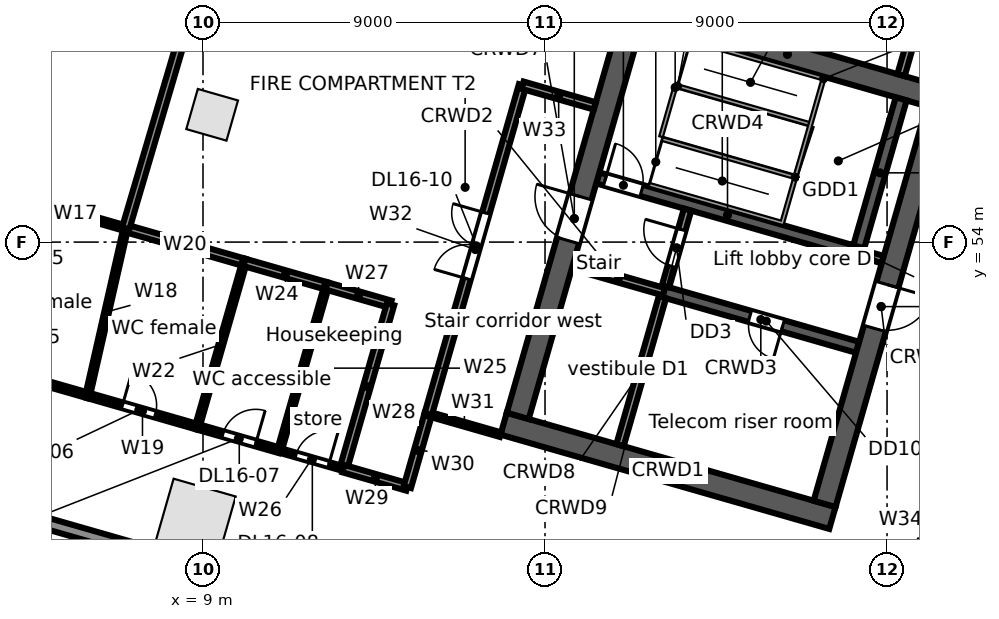
"""IFC4 building model, lengths in metres.
Left out: names, types, materials, properties, quantities, classifications, styles, units other than length and angle.
Written with IfcOpenShell. Run it as: python <this file> out.ifc"""

import sys

from ifc_helpers import new_model, si_unit, direction, frame, frame_2d, origin, origin_2d, place, context, subcontext, project, spatial, rectangle, extrude, element, fill, save


model = new_model("IFC4")
c1 = context("Model", 3, precision=1e-05, world=origin(), true_north=direction((0.0, 1.0)))
c2 = subcontext(c1, "Body", "Model", "MODEL_VIEW")
j1 = project(units=[si_unit("LENGTHUNIT", "METRE"), si_unit("PLANEANGLEUNIT", "RADIAN")], contexts=[c1])
p1 = place(None, origin())
s1 = spatial("IfcSite", under=j1, at=p1, CompositionType="ELEMENT")
p2 = place(p1, origin())
s2 = spatial("IfcBuilding", under=s1, at=p2, CompositionType="ELEMENT")
p3 = place(p2, frame((0.0, 0.0, 81.5)))
s3 = spatial("IfcBuildingStorey", under=s2, at=p3, CompositionType="ELEMENT", Elevation=81.5)
p4 = place(p3, frame((8.81, 46.722, 0.0), z_axis=(0.0, 0.0, 1.0), x_axis=(0.961261695938, -0.275637355817, 0.0)))
e1 = element("IfcColumn", 1, at=p4, inside=s3, PredefinedType="COLUMN", context=c2, shape_type="SweptSolid", body=[
    extrude(rectangle(XDim=1.7, YDim=1.7, at=origin_2d()), origin(), (0.0, 0.0, 1.0), 5.0),
])
p5 = place(p3, frame((9.241, 57.35, 0.0), z_axis=(0.0, 0.0, 1.0), x_axis=(0.961261695938, -0.275637355817, 0.0)))
e2 = element("IfcColumn", 2, at=p5, inside=s3, PredefinedType="COLUMN", context=c2, shape_type="SweptSolid", body=[
    extrude(rectangle(XDim=1.1, YDim=1.1, at=origin_2d()), origin(), (0.0, 0.0, 1.0), 5.0),
])
p6 = place(p3, frame((25.398, 40.717, 0.0), z_axis=(0.0, 0.0, 1.0), x_axis=(-0.961262423262, 0.275634819324, 0.0)))
e3 = element("IfcWall", 3, at=p6, inside=s3, PredefinedType="STANDARD", context=c2, shape_type="SweptSolid", body=[
    extrude(rectangle(XDim=26.359, YDim=0.3, at=frame_2d((13.179, 0.0))), origin(), (0.0, 0.0, 1.0), 4.68),
])
p7 = place(p6, frame((22.664, 0.0, 0.6)))
e4 = element("IfcOpeningElement", 4, at=p7, cuts=e3, PredefinedType="OPENING", context=c2, shape_type="SweptSolid", body=[
    extrude(rectangle(XDim=0.9, YDim=3.2, at=frame_2d((0.45, 1.6))), frame((0.0, 0.16, 0.0), z_axis=(0.0, -1.0, 0.0), x_axis=(1.0, 0.0, 0.0)), (0.0, 0.0, 1.0), 0.32),
])
p8 = place(p6, frame((13.844, 0.0, 0.6)))
e5 = element("IfcOpeningElement", 5, at=p8, cuts=e3, PredefinedType="OPENING", context=c2, shape_type="SweptSolid", body=[
    extrude(rectangle(XDim=0.9, YDim=3.2, at=frame_2d((0.45, 1.6))), frame((0.0, 0.16, 0.0), z_axis=(0.0, -1.0, 0.0), x_axis=(1.0, 0.0, 0.0)), (0.0, 0.0, 1.0), 0.32),
])
p9 = place(p6, frame((5.023, 0.0, 0.6)))
e6 = element("IfcOpeningElement", 6, at=p9, cuts=e3, PredefinedType="OPENING", context=c2, shape_type="SweptSolid", body=[
    extrude(rectangle(XDim=0.9, YDim=3.2, at=frame_2d((0.45, 1.6))), frame((0.0, 0.16, 0.0), z_axis=(0.0, -1.0, 0.0), x_axis=(1.0, 0.0, 0.0)), (0.0, 0.0, 1.0), 0.32),
])
p10 = place(p3, frame((16.911, 49.221, 0.0), z_axis=(0.0, 0.0, 1.0), x_axis=(0.96126248289, -0.275634611374, 0.0)))
e7 = element("IfcWall", 7, at=p10, inside=s3, PredefinedType="SOLIDWALL", context=c2, shape_type="SweptSolid", body=[
    extrude(rectangle(XDim=9.0, YDim=0.6, at=frame_2d((4.5, 0.0))), origin(), (0.0, 0.0, 1.0), 4.68),
])
p11 = place(p3, frame((18.728, 53.382, 0.0), z_axis=(0.0, 0.0, 1.0), x_axis=(0.961247070632, -0.275688355216, 0.0)))
e8 = element("IfcWall", 8, at=p11, inside=s3, PredefinedType="SOLIDWALL", context=c2, shape_type="SweptSolid", body=[
    extrude(rectangle(XDim=2.5, YDim=0.2, at=frame_2d((1.25, 0.0))), origin(), (0.0, 0.0, 1.0), 4.68),
])
p12 = place(p3, frame((21.131, 52.692, 0.0), z_axis=(0.0, 0.0, 1.0), x_axis=(0.961271492568, -0.275603188616, 0.0)))
e9 = element("IfcWall", 9, at=p12, inside=s3, PredefinedType="SOLIDWALL", context=c2, shape_type="SweptSolid", body=[
    extrude(rectangle(XDim=5.3, YDim=0.3, at=frame_2d((2.65, 0.0))), origin(), (0.0, 0.0, 1.0), 4.68),
])
p13 = place(p12, frame((2.35, 0.0, 0.0)))
e10 = element("IfcOpeningElement", 10, at=p13, cuts=e9, PredefinedType="OPENING", context=c2, shape_type="SweptSolid", body=[
    extrude(rectangle(XDim=0.9, YDim=2.1, at=frame_2d((0.45, 1.05))), frame((0.0, 0.16, 0.0), z_axis=(0.0, -1.0, 0.0), x_axis=(1.0, 0.0, 0.0)), (0.0, 0.0, 1.0), 0.32),
])
p14 = place(p3, frame((19.389, 55.689, 0.0), z_axis=(0.0, 0.0, 1.0), x_axis=(0.961261397636, -0.275638396117, 0.0)))
e11 = element("IfcWall", 11, at=p14, inside=s3, PredefinedType="SOLIDWALL", context=c2, shape_type="SweptSolid", body=[
    extrude(rectangle(XDim=7.1, YDim=0.3, at=frame_2d((3.55, 0.0))), origin(), (0.0, 0.0, 1.0), 4.68),
])
p15 = place(p14, frame((0.2, 0.0, 0.0)))
e12 = element("IfcOpeningElement", 12, at=p15, cuts=e11, PredefinedType="OPENING", context=c2, shape_type="SweptSolid", body=[
    extrude(rectangle(XDim=1.0, YDim=2.1, at=frame_2d((0.5, 1.05))), frame((0.0, 0.16, 0.0), z_axis=(0.0, -1.0, 0.0), x_axis=(1.0, 0.0, 0.0)), (0.0, 0.0, 1.0), 0.32),
])
p16 = place(p3, frame((26.214, 53.732, 0.0), z_axis=(0.0, 0.0, 1.0), x_axis=(0.96122076476, -0.27578005982, 0.0)))
e13 = element("IfcWall", 13, at=p16, inside=s3, PredefinedType="SOLIDWALL", context=c2, shape_type="SweptSolid", body=[
    extrude(rectangle(XDim=0.7, YDim=0.2, at=frame_2d((0.35, 0.0))), origin(), (0.0, 0.0, 1.0), 4.68),
])
p17 = place(p3, frame((20.053, 60.18, 0.0), z_axis=(0.0, 0.0, 1.0), x_axis=(0.96126248289, -0.275634611374, 0.0)))
e14 = element("IfcWall", 14, at=p17, inside=s3, PredefinedType="SOLIDWALL", context=c2, shape_type="SweptSolid", body=[
    extrude(rectangle(XDim=9.0, YDim=0.6, at=frame_2d((4.5, 0.0))), origin(), (0.0, 0.0, 1.0), 4.68),
])
p18 = place(p3, frame((17.282, 49.427, 0.0), z_axis=(0.0, 0.0, 1.0), x_axis=(0.275631631629, 0.961263337304, 0.0)))
e15 = element("IfcWall", 15, at=p18, inside=s3, PredefinedType="SOLIDWALL", context=c2, shape_type="SweptSolid", body=[
    extrude(rectangle(XDim=10.8, YDim=0.6, at=frame_2d((5.4, 0.0))), origin(), (0.0, 0.0, 1.0), 4.68),
])
p19 = place(p18, frame((4.8, 0.0, 0.0)))
e16 = element("IfcOpeningElement", 16, at=p19, cuts=e15, PredefinedType="OPENING", context=c2, shape_type="SweptSolid", body=[
    extrude(rectangle(XDim=1.2, YDim=2.1, at=frame_2d((0.6, 1.05))), frame((0.0, 0.31, 0.0), z_axis=(0.0, -1.0, 0.0), x_axis=(1.0, 0.0, 0.0)), (0.0, 0.0, 1.0), 0.62),
])
p20 = place(p3, frame((19.973, 48.655, 0.0), z_axis=(0.0, 0.0, 1.0), x_axis=(0.275668441653, 0.961252781674, 0.0)))
e17 = element("IfcWall", 17, at=p20, inside=s3, PredefinedType="SOLIDWALL", context=c2, shape_type="SweptSolid", body=[
    extrude(rectangle(XDim=4.05, YDim=0.2, at=frame_2d((2.025, 0.0))), origin(), (0.0, 0.0, 1.0), 4.68),
])
p21 = place(p3, frame((21.172, 52.837, 0.0), z_axis=(0.0, 0.0, 1.0), x_axis=(0.275657676022, 0.961255868981, 0.0)))
e18 = element("IfcWall", 18, at=p21, inside=s3, PredefinedType="PARTITIONING", context=c2, shape_type="SweptSolid", body=[
    extrude(rectangle(XDim=2.1, YDim=0.2, at=frame_2d((1.05, 0.0))), origin(), (0.0, 0.0, 1.0), 4.68),
])
p22 = place(p21, frame((0.55, 0.0, 0.0)))
e19 = element("IfcOpeningElement", 19, at=p22, cuts=e18, PredefinedType="OPENING", context=c2, shape_type="SweptSolid", body=[
    extrude(rectangle(XDim=1.0, YDim=2.1, at=frame_2d((0.5, 1.05))), frame((0.0, 0.11, 0.0), z_axis=(0.0, -1.0, 0.0), x_axis=(1.0, 0.0, 0.0)), (0.0, 0.0, 1.0), 0.22),
])
p23 = place(p3, frame((26.256, 53.876, 0.0), z_axis=(0.0, 0.0, 1.0), x_axis=(0.275612739511, 0.961268754209, 0.0)))
e20 = element("IfcWall", 20, at=p23, inside=s3, PredefinedType="SOLIDWALL", context=c2, shape_type="SweptSolid", body=[
    extrude(rectangle(XDim=4.05, YDim=0.3, at=frame_2d((2.025, 0.0))), origin(), (0.0, 0.0, 1.0), 4.68),
])
p24 = place(p3, frame((25.356, 47.112, 0.0), z_axis=(0.0, 0.0, 1.0), x_axis=(0.275631631629, 0.961263337304, 0.0)))
e21 = element("IfcWall", 21, at=p24, inside=s3, PredefinedType="SOLIDWALL", context=c2, shape_type="SweptSolid", body=[
    extrude(rectangle(XDim=10.8, YDim=0.6, at=frame_2d((5.4, 0.0))), origin(), (0.0, 0.0, 1.0), 4.68),
])
p25 = place(p24, frame((4.8, 0.0, 0.0)))
e22 = element("IfcOpeningElement", 22, at=p25, cuts=e21, PredefinedType="OPENING", context=c2, shape_type="SweptSolid", body=[
    extrude(rectangle(XDim=1.2, YDim=2.1, at=frame_2d((0.6, 1.05))), frame((0.0, 0.31, 0.0), z_axis=(0.0, -1.0, 0.0), x_axis=(1.0, 0.0, 0.0)), (0.0, 0.0, 1.0), 0.62),
])
p26 = place(p3, frame((2.601, 50.932, 0.0), z_axis=(0.0, 0.0, 1.0), x_axis=(0.961265606965, -0.27562371608, 0.0)))
e23 = element("IfcWall", 23, at=p26, inside=s3, PredefinedType="PARTITIONING", context=c2, shape_type="SweptSolid", body=[
    extrude(rectangle(XDim=3.5, YDim=0.15, at=frame_2d((1.75, 0.0))), origin(), (0.0, 0.0, 1.0), 4.68),
])
p27 = place(p26, frame((1.2, 0.0, 0.0)))
e24 = element("IfcOpeningElement", 24, at=p27, cuts=e23, PredefinedType="OPENING", context=c2, shape_type="SweptSolid", body=[
    extrude(rectangle(XDim=0.9, YDim=2.1, at=frame_2d((0.45, 1.05))), frame((0.0, 0.085, 0.0), z_axis=(0.0, -1.0, 0.0), x_axis=(1.0, 0.0, 0.0)), (0.0, 0.0, 1.0), 0.17),
])
p28 = place(p3, frame((4.322, 55.12, 0.0), z_axis=(0.0, 0.0, 1.0), x_axis=(0.961272337704, -0.275600240865, 0.0)))
e25 = element("IfcWall", 25, at=p28, inside=s3, PredefinedType="PARTITIONING", context=c2, shape_type="SweptSolid", body=[
    extrude(rectangle(XDim=2.75, YDim=0.15, at=frame_2d((1.375, 0.0))), origin(), (0.0, 0.0, 1.0), 4.68),
])
p29 = place(p3, frame((5.966, 49.967, 0.0), z_axis=(0.0, 0.0, 1.0), x_axis=(0.221859891223, 0.975078555126, 0.0)))
e26 = element("IfcWall", 26, at=p29, inside=s3, PredefinedType="PARTITIONING", context=c2, shape_type="SweptSolid", body=[
    extrude(rectangle(XDim=4.507, YDim=0.125, at=frame_2d((2.254, 0.0))), origin(), (0.0, 0.0, 1.0), 4.68),
])
p30 = place(p3, frame((5.966, 49.967, 0.0), z_axis=(0.0, 0.0, 1.0), x_axis=(0.961222353496, -0.275774522283, 0.0)))
e27 = element("IfcWall", 27, at=p30, inside=s3, PredefinedType="PARTITIONING", context=c2, shape_type="SweptSolid", body=[
    extrude(rectangle(XDim=2.999, YDim=0.15, at=frame_2d((1.5, 0.0))), origin(), (0.0, 0.0, 1.0), 3.852),
])
p31 = place(p30, frame((0.95, 0.0, 0.0)))
e28 = element("IfcOpeningElement", 28, at=p31, cuts=e27, PredefinedType="OPENING", context=c2, shape_type="SweptSolid", body=[
    extrude(rectangle(XDim=0.9, YDim=2.1, at=frame_2d((0.45, 1.05))), frame((0.0, 0.085, 0.0), z_axis=(0.0, -1.0, 0.0), x_axis=(1.0, 0.0, 0.0)), (0.0, 0.0, 1.0), 0.17),
])
p32 = place(p3, frame((6.966, 54.362, 0.0), z_axis=(0.0, 0.0, 1.0), x_axis=(0.961245650832, -0.275693305607, 0.0)))
e29 = element("IfcWall", 29, at=p32, inside=s3, PredefinedType="PARTITIONING", context=c2, shape_type="SweptSolid", body=[
    extrude(rectangle(XDim=3.25, YDim=0.2, at=frame_2d((1.625, 0.0))), origin(), (0.0, 0.0, 1.0), 3.852),
])
p33 = place(p3, frame((6.966, 54.362, 0.0), z_axis=(0.0, 0.0, 1.0), x_axis=(0.283027392509, 0.959111826165, 0.0)))
e30 = element("IfcWall", 30, at=p33, inside=s3, PredefinedType="PARTITIONING", context=c2, shape_type="SweptSolid", body=[
    extrude(rectangle(XDim=12.985, YDim=0.2, at=frame_2d((6.492, 0.0))), origin(), (0.0, 0.0, 1.0), 3.742),
])
p34 = place(p3, frame((8.849, 49.14, 0.0), z_axis=(0.0, 0.0, 1.0), x_axis=(0.275731175537, 0.961234788612, 0.0)))
e31 = element("IfcWall", 31, at=p34, inside=s3, PredefinedType="PARTITIONING", context=c2, shape_type="SweptSolid", body=[
    extrude(rectangle(XDim=4.501, YDim=0.125, at=frame_2d((2.25, 0.0))), origin(), (0.0, 0.0, 1.0), 3.852),
])
p35 = place(p3, frame((8.849, 49.14, 0.0), z_axis=(0.0, 0.0, 1.0), x_axis=(0.961298413165, -0.275509275429, 0.0)))
e32 = element("IfcWall", 32, at=p35, inside=s3, PredefinedType="PARTITIONING", context=c2, shape_type="SweptSolid", body=[
    extrude(rectangle(XDim=2.25, YDim=0.15, at=frame_2d((1.125, 0.0))), origin(), (0.0, 0.0, 1.0), 3.742),
])
p36 = place(p35, frame((0.7, 0.0, 0.0)))
e33 = element("IfcOpeningElement", 33, at=p36, cuts=e32, PredefinedType="OPENING", context=c2, shape_type="SweptSolid", body=[
    extrude(rectangle(XDim=0.9, YDim=2.1, at=frame_2d((0.45, 1.05))), frame((0.0, 0.085, 0.0), z_axis=(0.0, -1.0, 0.0), x_axis=(1.0, 0.0, 0.0)), (0.0, 0.0, 1.0), 0.17),
])
p37 = place(p3, frame((10.09, 53.466, 0.0), z_axis=(0.0, 0.0, 1.0), x_axis=(0.961269670038, -0.275609545309, 0.0)))
e34 = element("IfcWall", 34, at=p37, inside=s3, PredefinedType="PARTITIONING", context=c2, shape_type="SweptSolid", body=[
    extrude(rectangle(XDim=2.25, YDim=0.2, at=frame_2d((1.125, 0.0))), origin(), (0.0, 0.0, 1.0), 3.742),
])
p38 = place(p3, frame((11.012, 48.52, 0.0), z_axis=(0.0, 0.0, 1.0), x_axis=(0.275745553681, 0.96123066411, 0.0)))
e35 = element("IfcWall", 35, at=p38, inside=s3, PredefinedType="PARTITIONING", context=c2, shape_type="SweptSolid", body=[
    extrude(rectangle(XDim=4.5, YDim=0.125, at=frame_2d((2.25, 0.0))), origin(), (0.0, 0.0, 1.0), 4.68),
])
p39 = place(p3, frame((11.012, 48.52, 0.0), z_axis=(0.0, 0.0, 1.0), x_axis=(0.961323619822, -0.275421309946, 0.0)))
e36 = element("IfcWall", 36, at=p39, inside=s3, PredefinedType="PARTITIONING", context=c2, shape_type="SweptSolid", body=[
    extrude(rectangle(XDim=1.75, YDim=0.125, at=frame_2d((0.875, 0.0))), origin(), (0.0, 0.0, 1.0), 4.68),
])
p40 = place(p39, frame((0.45, 0.0, 0.0)))
e37 = element("IfcOpeningElement", 37, at=p40, cuts=e36, PredefinedType="OPENING", context=c2, shape_type="SweptSolid", body=[
    extrude(rectangle(XDim=0.9, YDim=2.1, at=frame_2d((0.45, 1.05))), frame((0.0, 0.073, 0.0), z_axis=(0.0, -1.0, 0.0), x_axis=(1.0, 0.0, 0.0)), (0.0, 0.0, 1.0), 0.145),
])
p41 = place(p3, frame((12.253, 52.846, 0.0), z_axis=(0.0, 0.0, 1.0), x_axis=(0.961175737212, -0.275936953296, 0.0)))
e38 = element("IfcWall", 38, at=p41, inside=s3, PredefinedType="PARTITIONING", context=c2, shape_type="SweptSolid", body=[
    extrude(rectangle(XDim=1.75, YDim=0.2, at=frame_2d((0.875, 0.0))), origin(), (0.0, 0.0, 1.0), 4.68),
])
p42 = place(p3, frame((12.694, 48.038, 0.0), z_axis=(0.0, 0.0, 1.0), x_axis=(0.275803080638, 0.96121415965, 0.0)))
e39 = element("IfcWall", 39, at=p42, inside=s3, PredefinedType="PARTITIONING", context=c2, shape_type="SweptSolid", body=[
    extrude(rectangle(XDim=4.5, YDim=0.2, at=frame_2d((2.25, 0.0))), origin(), (0.0, 0.0, 1.0), 4.68),
])
p43 = place(p3, frame((12.694, 48.038, 0.0), z_axis=(0.0, 0.0, 1.0), x_axis=(0.961170605556, -0.275954827854, 0.0)))
e40 = element("IfcWall", 40, at=p43, inside=s3, PredefinedType="PARTITIONING", context=c2, shape_type="SweptSolid", body=[
    extrude(rectangle(XDim=1.751, YDim=0.2, at=frame_2d((0.875, 0.0))), origin(), (0.0, 0.0, 1.0), 4.68),
])
p44 = place(p3, frame((14.377, 47.555, 0.0), z_axis=(0.0, 0.0, 1.0), x_axis=(0.275446387355, 0.961316434736, 0.0)))
e41 = element("IfcWall", 41, at=p44, inside=s3, PredefinedType="PARTITIONING", context=c2, shape_type="SweptSolid", body=[
    extrude(rectangle(XDim=2.0, YDim=0.2, at=frame_2d((1.0, 0.0))), origin(), (0.0, 0.0, 1.0), 4.68),
])
p45 = place(p3, frame((14.928, 49.478, 0.0), z_axis=(0.0, 0.0, 1.0), x_axis=(0.961243778232, -0.27569983462, 0.0)))
e42 = element("IfcWall", 42, at=p45, inside=s3, PredefinedType="PARTITIONING", context=c2, shape_type="SweptSolid", body=[
    extrude(rectangle(XDim=1.977, YDim=0.125, at=frame_2d((0.988, 0.0))), origin(), (0.0, 0.0, 1.0), 4.68),
])
p46 = place(p3, frame((14.928, 49.478, 0.0), z_axis=(0.0, 0.0, 1.0), x_axis=(0.275674053528, 0.961251172281, 0.0)))
e43 = element("IfcWall", 43, at=p46, inside=s3, PredefinedType="PARTITIONING", context=c2, shape_type="SweptSolid", body=[
    extrude(rectangle(XDim=9.0, YDim=0.2, at=frame_2d((4.5, 0.0))), origin(), (0.0, 0.0, 1.0), 3.742),
])
p47 = place(p46, frame((3.7, 0.0, 0.0)))
e44 = element("IfcOpeningElement", 44, at=p47, cuts=e43, PredefinedType="OPENING", context=c2, shape_type="SweptSolid", body=[
    extrude(rectangle(XDim=1.8, YDim=2.1, at=frame_2d((0.9, 1.05))), frame((0.0, 0.11, 0.0), z_axis=(0.0, -1.0, 0.0), x_axis=(1.0, 0.0, 0.0)), (0.0, 0.0, 1.0), 0.22),
])
p48 = place(p3, frame((17.409, 58.129, 0.0), z_axis=(0.0, 0.0, 1.0), x_axis=(0.961253165474, -0.275667103345, 0.0)))
e45 = element("IfcWall", 45, at=p48, inside=s3, PredefinedType="PARTITIONING", context=c2, shape_type="SweptSolid", body=[
    extrude(rectangle(XDim=1.977, YDim=0.2, at=frame_2d((0.988, 0.0))), origin(), (0.0, 0.0, 1.0), 4.68),
])
p49 = place(p3, frame((26.456, 42.338, 0.0), z_axis=(0.0, 0.0, 1.0), x_axis=(0.52980027265, 0.848122438743, 0.0)))
e46 = element("IfcWall", 46, at=p49, inside=s3, PredefinedType="PARTITIONING", context=c2, shape_type="SweptSolid", body=[
    extrude(rectangle(XDim=6.076, YDim=0.25, at=frame_2d((3.038, 0.0))), origin(), (0.0, 0.0, 1.0), 4.68),
])
p50 = place(p49, frame((2.2, 0.0, 0.0)))
e47 = element("IfcOpeningElement", 47, at=p50, cuts=e46, PredefinedType="OPENING", context=c2, shape_type="SweptSolid", body=[
    extrude(rectangle(XDim=1.8, YDim=2.1, at=frame_2d((0.9, 1.05))), frame((0.0, 0.135, 0.0), z_axis=(0.0, -1.0, 0.0), x_axis=(1.0, 0.0, 0.0)), (0.0, 0.0, 1.0), 0.27),
])
p51 = place(p3, frame((27.368, 58.394, 0.0), z_axis=(0.0, 0.0, 1.0), x_axis=(0.276295387056, 0.961072764722, 0.0)))
e48 = element("IfcWall", 48, at=p51, inside=s3, PredefinedType="PARTITIONING", context=c2, shape_type="SweptSolid", body=[
    extrude(rectangle(XDim=5.386, YDim=0.2, at=frame_2d((2.693, 0.0))), origin(), (0.0, 0.0, 1.0), 3.748),
])
p52 = place(p15, origin())
e49 = element("IfcDoor", 49, at=p52, inside=s3, OperationType="SINGLE_SWING_LEFT", PredefinedType="DOOR", context=c2, shape_type="SweptSolid", body=[
    extrude(rectangle(XDim=1.0, YDim=2.1, at=frame_2d((0.5, 1.05))), frame((0.0, 0.025, 0.0), z_axis=(0.0, -1.0, 0.0), x_axis=(1.0, 0.0, 0.0)), (0.0, 0.0, 1.0), 0.05),
])
fill(e12, e49)
p53 = place(p22, origin())
e50 = element("IfcDoor", 50, at=p53, inside=s3, OperationType="SINGLE_SWING_RIGHT", PredefinedType="DOOR", context=c2, shape_type="SweptSolid", body=[
    extrude(rectangle(XDim=1.0, YDim=2.1, at=frame_2d((0.5, 1.05))), frame((0.0, 0.025, 0.0), z_axis=(0.0, -1.0, 0.0), x_axis=(1.0, 0.0, 0.0)), (0.0, 0.0, 1.0), 0.05),
])
fill(e19, e50)
p54 = place(p19, origin())
e51 = element("IfcDoor", 51, at=p54, inside=s3, OperationType="SINGLE_SWING_RIGHT", PredefinedType="DOOR", context=c2, shape_type="SweptSolid", body=[
    extrude(rectangle(XDim=1.2, YDim=2.1, at=frame_2d((0.6, 1.05))), frame((0.0, 0.025, 0.0), z_axis=(0.0, -1.0, 0.0), x_axis=(1.0, 0.0, 0.0)), (0.0, 0.0, 1.0), 0.05),
])
fill(e16, e51)
p55 = place(p25, frame((1.2, 0.0, 0.0), z_axis=(0.0, 0.0, 1.0), x_axis=(-1.0, 0.0, 0.0)))
e52 = element("IfcDoor", 52, at=p55, inside=s3, OperationType="SINGLE_SWING_LEFT", PredefinedType="DOOR", context=c2, shape_type="SweptSolid", body=[
    extrude(rectangle(XDim=1.2, YDim=2.1, at=frame_2d((0.6, 1.05))), frame((0.0, 0.025, 0.0), z_axis=(0.0, -1.0, 0.0), x_axis=(1.0, 0.0, 0.0)), (0.0, 0.0, 1.0), 0.05),
])
fill(e22, e52)
p56 = place(p13, frame((0.9, 0.0, 0.0), z_axis=(0.0, 0.0, 1.0), x_axis=(-1.0, 0.0, 0.0)))
e53 = element("IfcDoor", 53, at=p56, inside=s3, OperationType="SINGLE_SWING_LEFT", PredefinedType="DOOR", context=c2, shape_type="SweptSolid", body=[
    extrude(rectangle(XDim=0.9, YDim=2.1, at=frame_2d((0.45, 1.05))), frame((0.0, 0.025, 0.0), z_axis=(0.0, -1.0, 0.0), x_axis=(1.0, 0.0, 0.0)), (0.0, 0.0, 1.0), 0.05),
])
fill(e10, e53)
p57 = place(p31, origin())
e54 = element("IfcDoor", 54, at=p57, inside=s3, OperationType="SINGLE_SWING_LEFT", PredefinedType="DOOR", context=c2, shape_type="SweptSolid", body=[
    extrude(rectangle(XDim=0.9, YDim=2.1, at=frame_2d((0.45, 1.05))), frame((0.0, 0.025, 0.0), z_axis=(0.0, -1.0, 0.0), x_axis=(1.0, 0.0, 0.0)), (0.0, 0.0, 1.0), 0.05),
])
fill(e28, e54)
p58 = place(p36, origin())
e55 = element("IfcDoor", 55, at=p58, inside=s3, OperationType="SINGLE_SWING_RIGHT", PredefinedType="DOOR", context=c2, shape_type="SweptSolid", body=[
    extrude(rectangle(XDim=0.9, YDim=2.1, at=frame_2d((0.45, 1.05))), frame((0.0, 0.025, 0.0), z_axis=(0.0, -1.0, 0.0), x_axis=(1.0, 0.0, 0.0)), (0.0, 0.0, 1.0), 0.05),
])
fill(e33, e55)
p59 = place(p40, origin())
e56 = element("IfcDoor", 56, at=p59, inside=s3, OperationType="SINGLE_SWING_RIGHT", PredefinedType="DOOR", context=c2, shape_type="SweptSolid", body=[
    extrude(rectangle(XDim=0.9, YDim=2.1, at=frame_2d((0.45, 1.05))), frame((0.0, 0.025, 0.0), z_axis=(0.0, -1.0, 0.0), x_axis=(1.0, 0.0, 0.0)), (0.0, 0.0, 1.0), 0.05),
])
fill(e37, e56)
p60 = place(p47, origin())
e57 = element("IfcDoor", 57, at=p60, inside=s3, OperationType="DOUBLE_DOOR_SINGLE_SWING", PredefinedType="DOOR", context=c2, shape_type="SweptSolid", body=[
    extrude(rectangle(XDim=1.8, YDim=2.1, at=frame_2d((0.9, 1.05))), frame((0.0, 0.025, 0.0), z_axis=(0.0, -1.0, 0.0), x_axis=(1.0, 0.0, 0.0)), (0.0, 0.0, 1.0), 0.05),
])
fill(e44, e57)
save(model, sys.argv[1])
